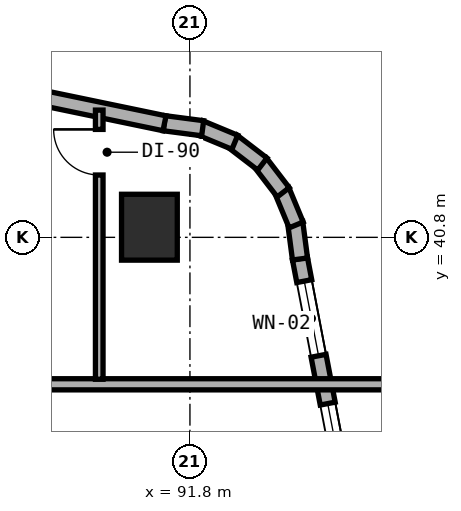
"""IFC4 building model, lengths in metres.
Left out: names, types, materials, properties, quantities, classifications, styles, units other than length and angle.
Written with IfcOpenShell. Run it as: python <this file> out.ifc"""

import sys

from ifc_helpers import new_model, si_unit, direction, frame, frame_2d, origin, origin_2d, place, context, subcontext, project, spatial, rectangle, extrude, element, fill, save


model = new_model("IFC4")
c1 = context("Model", 3, precision=1e-05, world=origin(), true_north=direction((0.0, 1.0)))
c2 = subcontext(c1, "Body", "Model", "MODEL_VIEW")
j1 = project(units=[si_unit("LENGTHUNIT", "METRE"), si_unit("PLANEANGLEUNIT", "RADIAN")], contexts=[c1])
p1 = place(None, origin())
s1 = spatial("IfcSite", under=j1, at=p1, CompositionType="ELEMENT")
p2 = place(p1, origin())
s2 = spatial("IfcBuilding", under=s1, at=p2, CompositionType="ELEMENT")
p3 = place(p2, frame((0.0, 0.0, 45.0)))
s3 = spatial("IfcBuildingStorey", under=s2, at=p3, CompositionType="ELEMENT", Elevation=45.0)
p4 = place(p3, frame((91.0, 41.0, 0.0), z_axis=(0.0, 0.0, 1.0), x_axis=(1.0, 0.0, 0.0)))
e1 = element("IfcColumn", 1, at=p4, inside=s3, PredefinedType="COLUMN", context=c2, shape_type="SweptSolid", body=[
    extrude(rectangle(XDim=1.1, YDim=1.3, at=origin_2d()), origin(), (0.0, 0.0, 1.0), 3.5),
])
p5 = place(p3, frame((95.783, 30.918, 0.0), z_axis=(0.0, 0.0, 1.0), x_axis=(-0.188087874316, 0.982152203854, 0.0)))
e2 = element("IfcWall", 2, at=p5, inside=s3, PredefinedType="STANDARD", context=c2, shape_type="SweptSolid", body=[
    extrude(rectangle(XDim=9.634, YDim=0.3, at=frame_2d((4.817, 0.0))), origin(), (0.0, 0.0, 1.0), 3.25),
])
p6 = place(p5, frame((1.306, 0.0, 0.8)))
e3 = element("IfcOpeningElement", 3, at=p6, cuts=e2, PredefinedType="OPENING", context=c2, shape_type="SweptSolid", body=[
    extrude(rectangle(XDim=2.4, YDim=1.6, at=frame_2d((1.2, 0.8))), frame((0.0, 0.16, 0.0), z_axis=(0.0, -1.0, 0.0), x_axis=(1.0, 0.0, 0.0)), (0.0, 0.0, 1.0), 0.32),
])
p7 = place(p5, frame((5.521, 0.0, 0.85)))
e4 = element("IfcOpeningElement", 4, at=p7, cuts=e2, PredefinedType="OPENING", context=c2, shape_type="SweptSolid", body=[
    extrude(rectangle(XDim=1.2, YDim=1.5, at=frame_2d((0.6, 0.75))), frame((0.0, 0.16, 0.0), z_axis=(0.0, -1.0, 0.0), x_axis=(1.0, 0.0, 0.0)), (0.0, 0.0, 1.0), 0.32),
])
p8 = place(p5, frame((7.682, 0.0, 0.85)))
e5 = element("IfcOpeningElement", 5, at=p8, cuts=e2, PredefinedType="OPENING", context=c2, shape_type="SweptSolid", body=[
    extrude(rectangle(XDim=1.5, YDim=1.5, at=frame_2d((0.75, 0.75))), frame((0.0, 0.16, 0.0), z_axis=(0.0, -1.0, 0.0), x_axis=(1.0, 0.0, 0.0)), (0.0, 0.0, 1.0), 0.32),
])
p9 = place(p3, frame((93.972, 40.373, 0.0), z_axis=(0.0, 0.0, 1.0), x_axis=(-0.130255288807, 0.991480488834, 0.0)))
e6 = element("IfcWall", 6, at=p9, inside=s3, PredefinedType="STANDARD", context=c2, shape_type="SweptSolid", body=[
    extrude(rectangle(XDim=0.729, YDim=0.3, at=frame_2d((0.365, 0.0))), origin(), (0.0, 0.0, 1.0), 3.25),
])
p10 = place(p3, frame((93.896, 41.045, 0.0), z_axis=(0.0, 0.0, 1.0), x_axis=(-0.383267045233, 0.923637576129, 0.0)))
e7 = element("IfcWall", 7, at=p10, inside=s3, PredefinedType="STANDARD", context=c2, shape_type="SweptSolid", body=[
    extrude(rectangle(XDim=0.746, YDim=0.3, at=frame_2d((0.373, 0.0))), origin(), (0.0, 0.0, 1.0), 3.25),
])
for number, where, z_axis, x_axis in (
    (8, (93.641, 41.689, 0.0), (0.0, 0.0, 1.0), (-0.609, 0.793, 0.0)),
    (9, (93.229, 42.246, 0.0), (0.0, 0.0, 1.0), (-0.794, 0.608, 0.0)),
):
    element("IfcWall", number, at=place(p3, frame(where, z_axis=z_axis, x_axis=x_axis)), inside=s3, PredefinedType="STANDARD", context=c2, shape_type="SweptSolid", body=[
        extrude(rectangle(XDim=0.746, YDim=0.3, at=frame_2d((0.373, 0.0))), origin(), (0.0, 0.0, 1.0), 3.25),
    ])
p11 = place(p3, frame((92.686, 42.676, 0.0), z_axis=(0.0, 0.0, 1.0), x_axis=(-0.923637576129, 0.383267045233, 0.0)))
e10 = element("IfcWall", 10, at=p11, inside=s3, PredefinedType="STANDARD", context=c2, shape_type="SweptSolid", body=[
    extrude(rectangle(XDim=0.746, YDim=0.3, at=frame_2d((0.373, 0.0))), origin(), (0.0, 0.0, 1.0), 3.25),
])
p12 = place(p3, frame((92.051, 42.953, 0.0), z_axis=(0.0, 0.0, 1.0), x_axis=(-0.991559404866, 0.129653178221, 0.0)))
e11 = element("IfcWall", 11, at=p12, inside=s3, PredefinedType="STANDARD", context=c2, shape_type="SweptSolid", body=[
    extrude(rectangle(XDim=0.764, YDim=0.3, at=frame_2d((0.382, 0.0))), origin(), (0.0, 0.0, 1.0), 3.25),
])
p13 = place(p3, frame((91.298, 43.051, 0.0), z_axis=(0.0, 0.0, 1.0), x_axis=(-0.979128391325, 0.203242695569, 0.0)))
e12 = element("IfcWall", 12, at=p13, inside=s3, PredefinedType="STANDARD", context=c2, shape_type="SweptSolid", body=[
    extrude(rectangle(XDim=8.92, YDim=0.3, at=frame_2d((4.46, 0.0))), origin(), (0.0, 0.0, 1.0), 3.25),
])
p14 = place(p13, frame((3.957, 0.0, 0.8)))
e13 = element("IfcOpeningElement", 13, at=p14, cuts=e12, PredefinedType="OPENING", context=c2, shape_type="SweptSolid", body=[
    extrude(rectangle(XDim=2.4, YDim=1.6, at=frame_2d((1.2, 0.8))), frame((0.0, 0.16, 0.0), z_axis=(0.0, -1.0, 0.0), x_axis=(1.0, 0.0, 0.0)), (0.0, 0.0, 1.0), 0.32),
])
p15 = place(p3, frame((88.35, 37.9, 0.0), z_axis=(0.0, 0.0, 1.0), x_axis=(1.0, 0.0, 0.0)))
e14 = element("IfcWall", 14, at=p15, inside=s3, PredefinedType="SOLIDWALL", context=c2, shape_type="SweptSolid", body=[
    extrude(rectangle(XDim=7.41, YDim=0.22, at=frame_2d((3.705, 0.0))), origin(), (0.0, 0.0, 1.0), 2.865),
])
p16 = place(p3, frame((90.01, 38.0, 0.0), z_axis=(0.0, 0.0, 1.0), x_axis=(0.0, 1.0, 0.0)))
e15 = element("IfcWall", 15, at=p16, inside=s3, PredefinedType="PARTITIONING", context=c2, shape_type="SweptSolid", body=[
    extrude(rectangle(XDim=5.311, YDim=0.15, at=frame_2d((2.656, 0.0))), origin(), (0.0, 0.0, 1.0), 2.865),
])
p17 = place(p16, frame((4.03, 0.0, 0.0)))
e16 = element("IfcOpeningElement", 16, at=p17, cuts=e15, PredefinedType="OPENING", context=c2, shape_type="SweptSolid", body=[
    extrude(rectangle(XDim=0.9, YDim=2.1, at=frame_2d((0.45, 1.05))), frame((0.0, 0.085, 0.0), z_axis=(0.0, -1.0, 0.0), x_axis=(1.0, 0.0, 0.0)), (0.0, 0.0, 1.0), 0.17),
])
p18 = place(p7, origin())
e17 = element("IfcWindow", 17, at=p18, inside=s3, PartitioningType="SINGLE_PANEL", PredefinedType="WINDOW", context=c2, shape_type="SweptSolid", body=[
    extrude(rectangle(XDim=1.2, YDim=1.5, at=frame_2d((0.6, 0.75))), frame((0.0, 0.03, 0.0), z_axis=(0.0, -1.0, 0.0), x_axis=(1.0, 0.0, 0.0)), (0.0, 0.0, 1.0), 0.06),
])
fill(e4, e17)
p19 = place(p8, origin())
e18 = element("IfcWindow", 18, at=p19, inside=s3, PartitioningType="SINGLE_PANEL", PredefinedType="WINDOW", context=c2, shape_type="SweptSolid", body=[
    extrude(rectangle(XDim=1.5, YDim=1.5, at=frame_2d((0.75, 0.75))), frame((0.0, 0.03, 0.0), z_axis=(0.0, -1.0, 0.0), x_axis=(1.0, 0.0, 0.0)), (0.0, 0.0, 1.0), 0.06),
])
fill(e5, e18)
p20 = place(p17, origin())
e19 = element("IfcDoor", 19, at=p20, inside=s3, OperationType="SINGLE_SWING_RIGHT", PredefinedType="DOOR", context=c2, shape_type="SweptSolid", body=[
    extrude(rectangle(XDim=0.9, YDim=2.1, at=frame_2d((0.45, 1.05))), frame((0.0, 0.025, 0.0), z_axis=(0.0, -1.0, 0.0), x_axis=(1.0, 0.0, 0.0)), (0.0, 0.0, 1.0), 0.05),
])
fill(e16, e19)
save(model, sys.argv[1])
